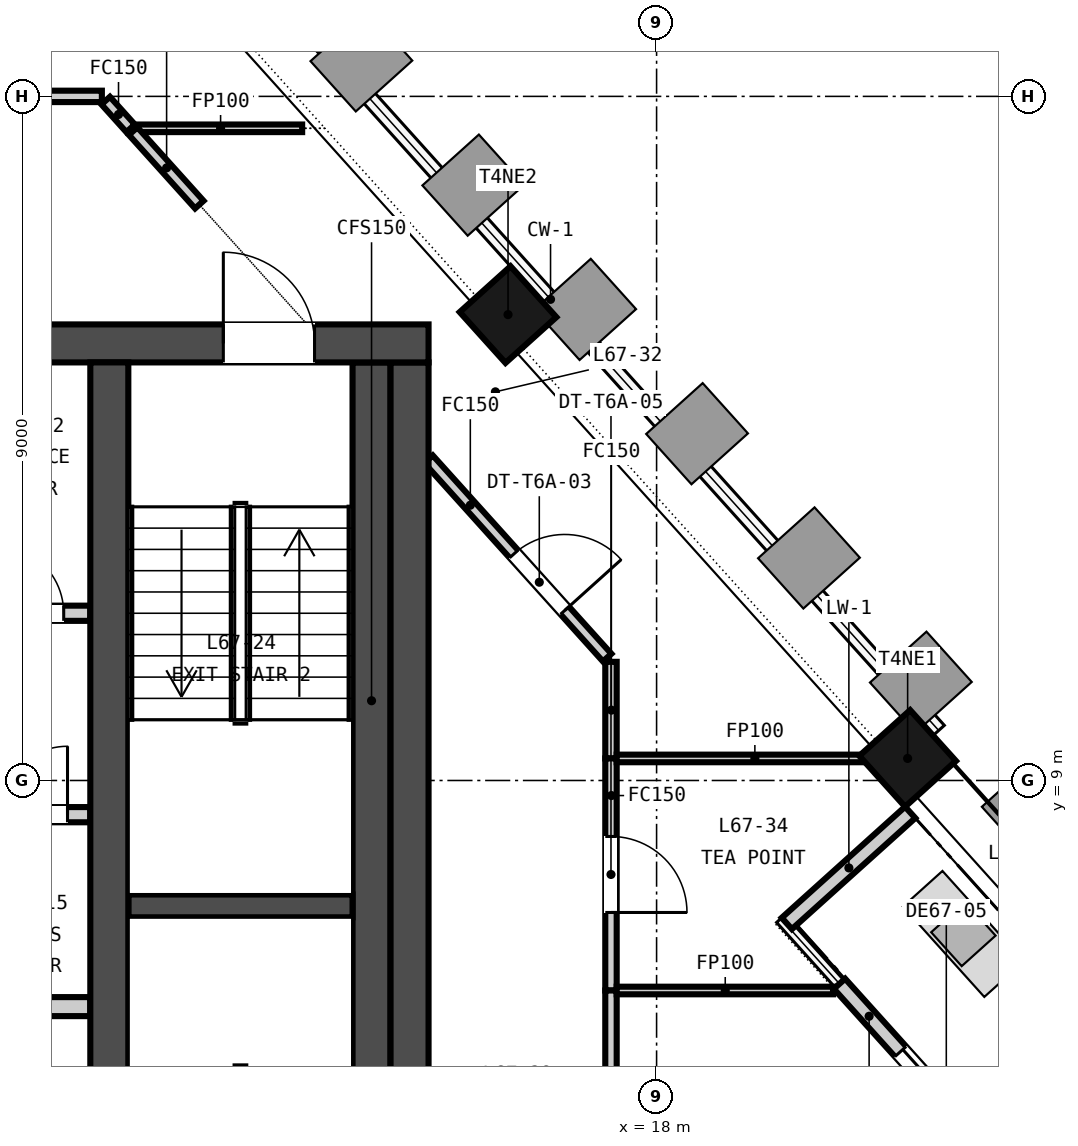
"""IFC4 building model, lengths in metres.
Left out: names, types, materials, properties, quantities, classifications, styles, units other than length and angle.
Written with IfcOpenShell. Run it as: python <this file> out.ifc"""

import sys

from ifc_helpers import new_model, si_unit, direction, frame, frame_2d, origin, origin_2d, place, context, subcontext, project, spatial, rectangle, extrude, element, fill, save


model = new_model("IFC4")
c1 = context("Model", 3, precision=1e-05, world=origin(), true_north=direction((0.0, 1.0)))
c2 = subcontext(c1, "Body", "Model", "MODEL_VIEW")
j1 = project(units=[si_unit("LENGTHUNIT", "METRE"), si_unit("PLANEANGLEUNIT", "RADIAN")], contexts=[c1])
p1 = place(None, origin())
s1 = spatial("IfcSite", under=j1, at=p1, CompositionType="ELEMENT")
p2 = place(p1, origin())
s2 = spatial("IfcBuilding", under=s1, at=p2, CompositionType="ELEMENT")
p3 = place(p2, frame((0.0, 0.0, 264.6)))
s3 = spatial("IfcBuildingStorey", under=s2, at=p3, CompositionType="ELEMENT", Elevation=264.6)
p4 = place(p3, frame((-15.0, 14.75, -0.15), z_axis=(0.0, 0.0, 1.0), x_axis=(1.0, 0.0, 0.0)))
e1 = element("IfcWall", 1, at=p4, inside=s3, PredefinedType="SOLIDWALL", context=c2, shape_type="SweptSolid", body=[
    extrude(rectangle(XDim=30.0, YDim=0.5, at=frame_2d((15.0, 0.0))), origin(), (0.0, 0.0, 1.0), 3.65),
])
p5 = place(p4, frame((9.25, 0.0, 0.15)))
e2 = element("IfcOpeningElement", 2, at=p5, cuts=e1, PredefinedType="OPENING", context=c2, shape_type="SweptSolid", body=[
    extrude(rectangle(XDim=1.5, YDim=2.1, at=frame_2d((0.75, 1.05))), frame((0.0, 0.26, 0.0), z_axis=(0.0, -1.0, 0.0), x_axis=(1.0, 0.0, 0.0)), (0.0, 0.0, 1.0), 0.52),
])
p6 = place(p4, frame((19.4, 0.0, 0.15)))
e3 = element("IfcOpeningElement", 3, at=p6, cuts=e1, PredefinedType="OPENING", context=c2, shape_type="SweptSolid", body=[
    extrude(rectangle(XDim=1.5, YDim=2.1, at=frame_2d((0.75, 1.05))), frame((0.0, 0.26, 0.0), z_axis=(0.0, -1.0, 0.0), x_axis=(1.0, 0.0, 0.0)), (0.0, 0.0, 1.0), 0.52),
])
p7 = place(p4, frame((1.5, 0.0, 0.15)))
e4 = element("IfcOpeningElement", 4, at=p7, cuts=e1, PredefinedType="OPENING", context=c2, shape_type="SweptSolid", body=[
    extrude(rectangle(XDim=1.2, YDim=2.1, at=frame_2d((0.6, 1.05))), frame((0.0, 0.26, 0.0), z_axis=(0.0, -1.0, 0.0), x_axis=(1.0, 0.0, 0.0)), (0.0, 0.0, 1.0), 0.52),
])
p8 = place(p4, frame((27.3, 0.0, 0.15)))
e5 = element("IfcOpeningElement", 5, at=p8, cuts=e1, PredefinedType="OPENING", context=c2, shape_type="SweptSolid", body=[
    extrude(rectangle(XDim=1.2, YDim=2.1, at=frame_2d((0.6, 1.05))), frame((0.0, 0.26, 0.0), z_axis=(0.0, -1.0, 0.0), x_axis=(1.0, 0.0, 0.0)), (0.0, 0.0, 1.0), 0.52),
])
for number, where, z_axis, x_axis in (
    (6, (14.75, 0.5, -0.15), (0.0, 0.0, 1.0), (0.0, 1.0, 0.0)),
    (7, (10.8, 0.5, -0.15), (0.0, 0.0, 1.0), (0.0, 1.0, 0.0)),
):
    element("IfcWall", number, at=place(p3, frame(where, z_axis=z_axis, x_axis=x_axis)), inside=s3, PredefinedType="SOLIDWALL", context=c2, shape_type="SweptSolid", body=[
        extrude(rectangle(XDim=14.0, YDim=0.5, at=frame_2d((7.0, 0.0))), origin(), (0.0, 0.0, 1.0), 3.65),
    ])
for number, where, z_axis, x_axis in (
    (8, (21.303, 9.29, -0.15), (0.0, 0.0, 1.0), (-0.669, 0.743, 0.0)),
    (9, (16.045, 15.129, -0.15), (0.0, 0.0, 1.0), (-0.669, 0.743, 0.0)),
):
    element("IfcColumn", number, at=place(p3, frame(where, z_axis=z_axis, x_axis=x_axis)), inside=s3, PredefinedType="COLUMN", context=c2, shape_type="SweptSolid", body=[
        extrude(rectangle(XDim=0.9, YDim=0.9, at=origin_2d()), origin(), (0.0, 0.0, 1.0), 3.65),
    ])
p9 = place(p3, frame((23.217, 3.204, 0.0), z_axis=(0.0, 0.0, 1.0), x_axis=(-0.669138140895, 0.743138041282, 0.0)))
e10 = element("IfcWall", 10, at=p9, inside=s3, PredefinedType="SOLIDWALL", context=c2, shape_type="SweptSolid", body=[
    extrude(rectangle(XDim=4.2, YDim=0.2, at=frame_2d((2.1, 0.0))), origin(), (0.0, 0.0, 1.0), 3.05),
])
p10 = place(p9, frame((1.2, 0.0, 0.0)))
e11 = element("IfcOpeningElement", 11, at=p10, cuts=e10, PredefinedType="OPENING", context=c2, shape_type="SweptSolid", body=[
    extrude(rectangle(XDim=1.8, YDim=2.4, at=frame_2d((0.9, 1.2))), frame((0.0, 0.11, 0.0), z_axis=(0.0, -1.0, 0.0), x_axis=(1.0, 0.0, 0.0)), (0.0, 0.0, 1.0), 0.22),
])
p11 = place(p3, frame((21.336, 8.58, 0.0), z_axis=(0.0, 0.0, 1.0), x_axis=(-0.743138493482, -0.669137638686, 0.0)))
e12 = element("IfcWall", 12, at=p11, inside=s3, PredefinedType="SOLIDWALL", context=c2, shape_type="SweptSolid", body=[
    extrude(rectangle(XDim=2.184, YDim=0.2, at=frame_2d((1.092, 0.0))), origin(), (0.0, 0.0, 1.0), 3.05),
])
p12 = place(p3, frame((-10.55, 6.025, 0.0), z_axis=(0.0, 0.0, 1.0), x_axis=(1.0, 0.0, 0.0)))
e13 = element("IfcWall", 13, at=p12, inside=s3, PredefinedType="PARTITIONING", context=c2, shape_type="SweptSolid", body=[
    extrude(rectangle(XDim=21.1, YDim=0.25, at=frame_2d((10.55, 0.0))), origin(), (0.0, 0.0, 1.0), 3.5),
])
p13 = place(p3, frame((-4.125, 8.55, 0.0), z_axis=(0.0, 0.0, 1.0), x_axis=(1.0, 0.0, 0.0)))
e14 = element("IfcWall", 14, at=p13, inside=s3, PredefinedType="PARTITIONING", context=c2, shape_type="SweptSolid", body=[
    extrude(rectangle(XDim=14.675, YDim=0.2, at=frame_2d((7.337, 0.0))), origin(), (0.0, 0.0, 1.0), 3.5),
])
p14 = place(p13, frame((2.438, 0.0, 0.0)))
e15 = element("IfcOpeningElement", 15, at=p14, cuts=e14, PredefinedType="OPENING", context=c2, shape_type="SweptSolid", body=[
    extrude(rectangle(XDim=1.0, YDim=2.1, at=frame_2d((0.5, 1.05))), frame((0.0, 0.11, 0.0), z_axis=(0.0, -1.0, 0.0), x_axis=(1.0, 0.0, 0.0)), (0.0, 0.0, 1.0), 0.22),
])
p15 = place(p13, frame((6.775, 0.0, 0.0)))
e16 = element("IfcOpeningElement", 16, at=p15, cuts=e14, PredefinedType="OPENING", context=c2, shape_type="SweptSolid", body=[
    extrude(rectangle(XDim=1.0, YDim=2.1, at=frame_2d((0.5, 1.05))), frame((0.0, 0.11, 0.0), z_axis=(0.0, -1.0, 0.0), x_axis=(1.0, 0.0, 0.0)), (0.0, 0.0, 1.0), 0.22),
])
p16 = place(p13, frame((10.363, 0.0, 0.0)))
e17 = element("IfcOpeningElement", 17, at=p16, cuts=e14, PredefinedType="OPENING", context=c2, shape_type="SweptSolid", body=[
    extrude(rectangle(XDim=1.0, YDim=2.1, at=frame_2d((0.5, 1.05))), frame((0.0, 0.11, 0.0), z_axis=(0.0, -1.0, 0.0), x_axis=(1.0, 0.0, 0.0)), (0.0, 0.0, 1.0), 0.22),
])
p17 = place(p13, frame((13.475, 0.0, 0.0)))
e18 = element("IfcOpeningElement", 18, at=p17, cuts=e14, PredefinedType="OPENING", context=c2, shape_type="SweptSolid", body=[
    extrude(rectangle(XDim=0.9, YDim=2.1, at=frame_2d((0.45, 1.05))), frame((0.0, 0.11, 0.0), z_axis=(0.0, -1.0, 0.0), x_axis=(1.0, 0.0, 0.0)), (0.0, 0.0, 1.0), 0.22),
])
p18 = place(p3, frame((5.9, 11.2, 0.0), z_axis=(0.0, 0.0, 1.0), x_axis=(1.0, 0.0, 0.0)))
e19 = element("IfcWall", 19, at=p18, inside=s3, PredefinedType="PARTITIONING", context=c2, shape_type="SweptSolid", body=[
    extrude(rectangle(XDim=4.65, YDim=0.2, at=frame_2d((2.325, 0.0))), origin(), (0.0, 0.0, 1.0), 3.5),
])
p19 = place(p18, frame((1.075, 0.0, 0.0)))
e20 = element("IfcOpeningElement", 20, at=p19, cuts=e19, PredefinedType="OPENING", context=c2, shape_type="SweptSolid", body=[
    extrude(rectangle(XDim=0.9, YDim=2.1, at=frame_2d((0.45, 1.05))), frame((0.0, 0.11, 0.0), z_axis=(0.0, -1.0, 0.0), x_axis=(1.0, 0.0, 0.0)), (0.0, 0.0, 1.0), 0.22),
])
p20 = place(p18, frame((3.4, 0.0, 0.0)))
e21 = element("IfcOpeningElement", 21, at=p20, cuts=e19, PredefinedType="OPENING", context=c2, shape_type="SweptSolid", body=[
    extrude(rectangle(XDim=0.9, YDim=2.1, at=frame_2d((0.45, 1.05))), frame((0.0, 0.11, 0.0), z_axis=(0.0, -1.0, 0.0), x_axis=(1.0, 0.0, 0.0)), (0.0, 0.0, 1.0), 0.22),
])
p21 = place(p3, frame((11.05, 7.35, 0.0), z_axis=(0.0, 0.0, 1.0), x_axis=(1.0, 0.0, 0.0)))
e22 = element("IfcWall", 22, at=p21, inside=s3, PredefinedType="SOLIDWALL", context=c2, shape_type="SweptSolid", body=[
    extrude(rectangle(XDim=2.95, YDim=0.3, at=frame_2d((1.475, 0.0))), origin(), (0.0, 0.0, 1.0), 3.5),
])
p22 = place(p3, frame((14.25, 0.5, 0.0), z_axis=(0.0, 0.0, 1.0), x_axis=(0.0, 1.0, 0.0)))
e23 = element("IfcWall", 23, at=p22, inside=s3, PredefinedType="SOLIDWALL", context=c2, shape_type="SweptSolid", body=[
    extrude(rectangle(XDim=14.0, YDim=0.5, at=frame_2d((7.0, 0.0))), origin(), (0.0, 0.0, 1.0), 3.5),
])
p23 = place(p3, frame((17.4, 10.561, 0.0), z_axis=(0.0, 0.0, 1.0), x_axis=(0.0, -1.0, 0.0)))
e24 = element("IfcWall", 24, at=p23, inside=s3, PredefinedType="PARTITIONING", context=c2, shape_type="SweptSolid", body=[
    extrude(rectangle(XDim=1.271, YDim=0.15, at=frame_2d((0.635, 0.0))), origin(), (0.0, 0.0, 1.0), 2.75),
])
p24 = place(p3, frame((17.4, 9.29, 0.0), z_axis=(0.0, 0.0, 1.0), x_axis=(0.0, -1.0, 0.0)))
e25 = element("IfcWall", 25, at=p24, inside=s3, PredefinedType="PARTITIONING", context=c2, shape_type="SweptSolid", body=[
    extrude(rectangle(XDim=3.053, YDim=0.15, at=frame_2d((1.526, 0.0))), origin(), (0.0, 0.0, 1.0), 2.75),
])
p25 = place(p24, frame((1.027, 0.0, 0.0)))
e26 = element("IfcOpeningElement", 26, at=p25, cuts=e25, PredefinedType="OPENING", context=c2, shape_type="SweptSolid", body=[
    extrude(rectangle(XDim=1.0, YDim=2.1, at=frame_2d((0.5, 1.05))), frame((0.0, 0.085, 0.0), z_axis=(0.0, -1.0, 0.0), x_axis=(1.0, 0.0, 0.0)), (0.0, 0.0, 1.0), 0.17),
])
p26 = place(p3, frame((17.4, 6.237, 0.0), z_axis=(0.0, 0.0, 1.0), x_axis=(0.0, -1.0, 0.0)))
e27 = element("IfcWall", 27, at=p26, inside=s3, PredefinedType="PARTITIONING", context=c2, shape_type="SweptSolid", body=[
    extrude(rectangle(XDim=9.162, YDim=0.15, at=frame_2d((4.581, 0.0))), origin(), (0.0, 0.0, 1.0), 2.75),
])
p27 = place(p26, frame((4.081, 0.0, 0.0)))
e28 = element("IfcOpeningElement", 28, at=p27, cuts=e27, PredefinedType="OPENING", context=c2, shape_type="SweptSolid", body=[
    extrude(rectangle(XDim=1.0, YDim=2.1, at=frame_2d((0.5, 1.05))), frame((0.0, 0.085, 0.0), z_axis=(0.0, -1.0, 0.0), x_axis=(1.0, 0.0, 0.0)), (0.0, 0.0, 1.0), 0.17),
])
p28 = place(p3, frame((-0.125, 18.0, 0.0), z_axis=(0.0, 0.0, 1.0), x_axis=(1.0, 0.0, 0.0)))
e29 = element("IfcWall", 29, at=p28, inside=s3, PredefinedType="PARTITIONING", context=c2, shape_type="SweptSolid", body=[
    extrude(rectangle(XDim=10.827, YDim=0.15, at=frame_2d((5.414, 0.0))), origin(), (0.0, 0.0, 1.0), 2.75),
])
p29 = place(p28, frame((4.914, 0.0, 0.0)))
e30 = element("IfcOpeningElement", 30, at=p29, cuts=e29, PredefinedType="OPENING", context=c2, shape_type="SweptSolid", body=[
    extrude(rectangle(XDim=1.0, YDim=2.1, at=frame_2d((0.5, 1.05))), frame((0.0, 0.085, 0.0), z_axis=(0.0, -1.0, 0.0), x_axis=(1.0, 0.0, 0.0)), (0.0, 0.0, 1.0), 0.17),
])
p30 = place(p3, frame((10.752, 17.944, 0.0), z_axis=(0.0, 0.0, 1.0), x_axis=(0.669019774343, -0.74324460411, 0.0)))
e31 = element("IfcWall", 31, at=p30, inside=s3, PredefinedType="PARTITIONING", context=c2, shape_type="SweptSolid", body=[
    extrude(rectangle(XDim=0.49, YDim=0.15, at=frame_2d((0.245, 0.0))), origin(), (0.0, 0.0, 1.0), 2.75),
])
p31 = place(p3, frame((11.181, 17.58, 0.0), z_axis=(0.0, 0.0, 1.0), x_axis=(1.0, 0.0, 0.0)))
e32 = element("IfcWall", 32, at=p31, inside=s3, PredefinedType="PARTITIONING", context=c2, shape_type="SweptSolid", body=[
    extrude(rectangle(XDim=2.156, YDim=0.1, at=frame_2d((1.078, 0.0))), origin(), (0.0, 0.0, 1.0), 2.75),
])
p32 = place(p3, frame((11.114, 17.543, 0.0), z_axis=(0.0, 0.0, 1.0), x_axis=(0.669172057426, -0.743107500675, 0.0)))
e33 = element("IfcWall", 33, at=p32, inside=s3, PredefinedType="PARTITIONING", context=c2, shape_type="SweptSolid", body=[
    extrude(rectangle(XDim=1.301, YDim=0.15, at=frame_2d((0.65, 0.0))), origin(), (0.0, 0.0, 1.0), 2.75),
])
p33 = place(p3, frame((15.0, 13.226, 0.0), z_axis=(0.0, 0.0, 1.0), x_axis=(0.669187491984, -0.743093601488, 0.0)))
e34 = element("IfcWall", 34, at=p33, inside=s3, PredefinedType="PARTITIONING", context=c2, shape_type="SweptSolid", body=[
    extrude(rectangle(XDim=3.511, YDim=0.15, at=frame_2d((1.756, 0.0))), origin(), (0.0, 0.0, 1.0), 2.75),
])
p34 = place(p33, frame((1.677, 0.0, 0.0)))
e35 = element("IfcOpeningElement", 35, at=p34, cuts=e34, PredefinedType="OPENING", context=c2, shape_type="SweptSolid", body=[
    extrude(rectangle(XDim=1.0, YDim=2.1, at=frame_2d((0.5, 1.05))), frame((0.0, 0.085, 0.0), z_axis=(0.0, -1.0, 0.0), x_axis=(1.0, 0.0, 0.0)), (0.0, 0.0, 1.0), 0.17),
])
p35 = place(p3, frame((17.475, 9.29, 0.0), z_axis=(0.0, 0.0, 1.0), x_axis=(1.0, 0.0, 0.0)))
e36 = element("IfcWall", 36, at=p35, inside=s3, PredefinedType="PARTITIONING", context=c2, shape_type="SweptSolid", body=[
    extrude(rectangle(XDim=3.626, YDim=0.1, at=frame_2d((1.813, 0.0))), origin(), (0.0, 0.0, 1.0), 2.75),
])
p36 = place(p3, frame((17.475, 6.237, 0.0), z_axis=(0.0, 0.0, 1.0), x_axis=(1.0, 0.0, 0.0)))
e37 = element("IfcWall", 37, at=p36, inside=s3, PredefinedType="PARTITIONING", context=c2, shape_type="SweptSolid", body=[
    extrude(rectangle(XDim=2.846, YDim=0.1, at=frame_2d((1.423, 0.0))), origin(), (0.0, 0.0, 1.0), 2.75),
])
p37 = place(p10, origin())
e38 = element("IfcDoor", 38, at=p37, inside=s3, OperationType="SINGLE_SWING_LEFT", PredefinedType="DOOR", context=c2, shape_type="SweptSolid", body=[
    extrude(rectangle(XDim=1.8, YDim=2.4, at=frame_2d((0.9, 1.2))), frame((0.0, 0.025, 0.0), z_axis=(0.0, -1.0, 0.0), x_axis=(1.0, 0.0, 0.0)), (0.0, 0.0, 1.0), 0.05),
])
fill(e11, e38)
p38 = place(p17, origin())
e39 = element("IfcDoor", 39, at=p38, inside=s3, OperationType="SINGLE_SWING_RIGHT", PredefinedType="DOOR", context=c2, shape_type="SweptSolid", body=[
    extrude(rectangle(XDim=0.9, YDim=2.1, at=frame_2d((0.45, 1.05))), frame((0.0, 0.025, 0.0), z_axis=(0.0, -1.0, 0.0), x_axis=(1.0, 0.0, 0.0)), (0.0, 0.0, 1.0), 0.05),
])
fill(e18, e39)
p39 = place(p20, origin())
e40 = element("IfcDoor", 40, at=p39, inside=s3, OperationType="SINGLE_SWING_LEFT", PredefinedType="DOOR", context=c2, shape_type="SweptSolid", body=[
    extrude(rectangle(XDim=0.9, YDim=2.1, at=frame_2d((0.45, 1.05))), frame((0.0, 0.025, 0.0), z_axis=(0.0, -1.0, 0.0), x_axis=(1.0, 0.0, 0.0)), (0.0, 0.0, 1.0), 0.05),
])
fill(e21, e40)
p40 = place(p8, origin())
e41 = element("IfcDoor", 41, at=p40, inside=s3, OperationType="SINGLE_SWING_LEFT", PredefinedType="DOOR", context=c2, shape_type="SweptSolid", body=[
    extrude(rectangle(XDim=1.2, YDim=2.1, at=frame_2d((0.6, 1.05))), frame((0.0, 0.025, 0.0), z_axis=(0.0, -1.0, 0.0), x_axis=(1.0, 0.0, 0.0)), (0.0, 0.0, 1.0), 0.05),
])
fill(e5, e41)
p41 = place(p34, origin())
e42 = element("IfcDoor", 42, at=p41, inside=s3, OperationType="SINGLE_SWING_RIGHT", PredefinedType="DOOR", context=c2, shape_type="SweptSolid", body=[
    extrude(rectangle(XDim=1.0, YDim=2.1, at=frame_2d((0.5, 1.05))), frame((0.0, 0.025, 0.0), z_axis=(0.0, -1.0, 0.0), x_axis=(1.0, 0.0, 0.0)), (0.0, 0.0, 1.0), 0.05),
])
fill(e35, e42)
p42 = place(p25, origin())
e43 = element("IfcDoor", 43, at=p42, inside=s3, OperationType="SINGLE_SWING_RIGHT", PredefinedType="DOOR", context=c2, shape_type="SweptSolid", body=[
    extrude(rectangle(XDim=1.0, YDim=2.1, at=frame_2d((0.5, 1.05))), frame((0.0, 0.025, 0.0), z_axis=(0.0, -1.0, 0.0), x_axis=(1.0, 0.0, 0.0)), (0.0, 0.0, 1.0), 0.05),
])
fill(e26, e43)
save(model, sys.argv[1])
